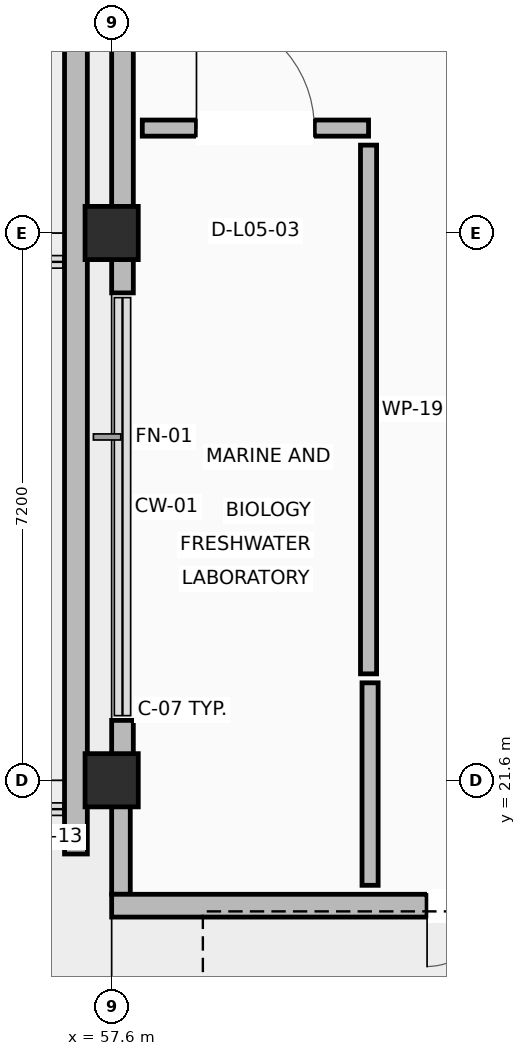
"""IFC4 building model, lengths in metres.
Left out: names, types, materials, properties, quantities, classifications, styles, units other than length and angle.
Written with IfcOpenShell. Run it as: python <this file> out.ifc"""

import sys

from ifc_helpers import new_model, si_unit, direction, frame, frame_2d, origin, origin_2d, place, context, subcontext, project, spatial, rectangle, extrude, element, fill, save


model = new_model("IFC4")
c1 = context("Model", 3, precision=1e-05, world=origin(), true_north=direction((0.0, 1.0)))
c2 = subcontext(c1, "Body", "Model", "MODEL_VIEW")
j1 = project(units=[si_unit("LENGTHUNIT", "METRE"), si_unit("PLANEANGLEUNIT", "RADIAN")], contexts=[c1])
p1 = place(None, origin())
s1 = spatial("IfcSite", under=j1, at=p1, CompositionType="ELEMENT")
p2 = place(p1, origin())
s2 = spatial("IfcBuilding", under=s1, at=p2, CompositionType="ELEMENT")
p3 = place(p2, frame((0.0, 0.0, 22.5)))
s3 = spatial("IfcBuildingStorey", under=s2, at=p3, CompositionType="ELEMENT", Elevation=22.5)
for number, where, z_axis, x_axis in (
    (1, (57.6, 21.6, 0.0), (0.0, 0.0, 1.0), (1.0, 0.0, 0.0)),
    (2, (57.6, 28.8, 0.0), (0.0, 0.0, 1.0), (1.0, 0.0, 0.0)),
):
    element("IfcColumn", number, at=place(p3, frame(where, z_axis=z_axis, x_axis=x_axis)), inside=s3, PredefinedType="COLUMN", context=c2, shape_type="SweptSolid", body=[
        extrude(rectangle(XDim=0.7, YDim=0.7, at=origin_2d()), origin(), (0.0, 0.0, 1.0), 4.5),
    ])
p4 = place(p3, frame((57.742, 28.8, 0.0), z_axis=(0.0, 0.0, 1.0), x_axis=(0.0, 1.0, 0.0)))
e3 = element("IfcWall", 3, at=p4, inside=s3, PredefinedType="STANDARD", context=c2, shape_type="SweptSolid", body=[
    extrude(rectangle(XDim=4.075, YDim=0.285, at=frame_2d((2.038, 0.0))), origin(), (0.0, 0.0, 1.0), 1.45),
])
p5 = place(p3, frame((57.722, 20.1, 0.0), z_axis=(0.0, 0.0, 1.0), x_axis=(0.0, 1.0, 0.0)))
e4 = element("IfcWall", 4, at=p5, inside=s3, PredefinedType="STANDARD", context=c2, shape_type="SweptSolid", body=[
    extrude(rectangle(XDim=1.5, YDim=0.245, at=frame_2d((0.75, 0.0))), origin(), (0.0, 0.0, 1.0), 1.45),
])
p6 = place(p3, frame((57.742, 28.8, 0.0), z_axis=(0.0, 0.0, 1.0), x_axis=(0.0, -1.0, 0.0)))
e5 = element("IfcWall", 5, at=p6, inside=s3, PredefinedType="STANDARD", context=c2, shape_type="SweptSolid", body=[
    extrude(rectangle(XDim=0.788, YDim=0.285, at=frame_2d((0.394, 0.0))), origin(), (0.0, 0.0, 1.0), 1.45),
])
p7 = place(p3, frame((57.742, 22.388, 0.0), z_axis=(0.0, 0.0, 1.0), x_axis=(0.0, -1.0, 0.0)))
e6 = element("IfcWall", 6, at=p7, inside=s3, PredefinedType="STANDARD", context=c2, shape_type="SweptSolid", body=[
    extrude(rectangle(XDim=0.788, YDim=0.285, at=frame_2d((0.394, 0.0))), origin(), (0.0, 0.0, 1.0), 1.45),
])
p8 = place(p3, frame((64.8, 19.95, 0.0), z_axis=(0.0, 0.0, 1.0), x_axis=(-1.0, 0.0, 0.0)))
e7 = element("IfcWall", 7, at=p8, inside=s3, PredefinedType="STANDARD", context=c2, shape_type="SweptSolid", body=[
    extrude(rectangle(XDim=7.2, YDim=0.3, at=frame_2d((3.6, 0.0))), origin(), (0.0, 0.0, 1.0), 3.26),
])
p9 = place(p8, frame((1.45, 0.0, 0.0)))
e8 = element("IfcOpeningElement", 8, at=p9, cuts=e7, PredefinedType="OPENING", context=c2, shape_type="SweptSolid", body=[
    extrude(rectangle(XDim=1.6, YDim=2.2, at=frame_2d((0.8, 1.1))), frame((0.0, 0.16, 0.0), z_axis=(0.0, -1.0, 0.0), x_axis=(1.0, 0.0, 0.0)), (0.0, 0.0, 1.0), 0.32),
])
p10 = place(p3, frame((57.13, 20.63, 0.0), z_axis=(0.0, 0.0, 1.0), x_axis=(0.0, 1.0, 0.0)))
e9 = element("IfcWall", 9, at=p10, inside=s3, PredefinedType="PARAPET", context=c2, shape_type="SweptSolid", body=[
    extrude(rectangle(XDim=11.74, YDim=0.3, at=frame_2d((5.87, 0.0))), origin(), (0.0, 0.0, 1.0), 1.18),
])
p11 = place(p3, frame((58.003, 30.18, 0.0), z_axis=(0.0, 0.0, 1.0), x_axis=(1.0, 0.0, 0.0)))
e10 = element("IfcWall", 10, at=p11, inside=s3, PredefinedType="PARTITIONING", context=c2, shape_type="SweptSolid", body=[
    extrude(rectangle(XDim=2.977, YDim=0.212, at=frame_2d((1.489, 0.0))), origin(), (0.0, 0.0, 1.0), 3.26),
])
p12 = place(p11, frame((0.713, 0.0, 0.0)))
e11 = element("IfcOpeningElement", 11, at=p12, cuts=e10, PredefinedType="OPENING", context=c2, shape_type="SweptSolid", body=[
    extrude(rectangle(XDim=1.55, YDim=2.2, at=frame_2d((0.775, 1.1))), frame((0.0, 0.116, 0.0), z_axis=(0.0, -1.0, 0.0), x_axis=(1.0, 0.0, 0.0)), (0.0, 0.0, 1.0), 0.232),
])
p13 = place(p3, frame((60.98, 29.956, 0.0), z_axis=(0.0, 0.0, 1.0), x_axis=(0.0, -1.0, 0.0)))
e12 = element("IfcWall", 12, at=p13, inside=s3, PredefinedType="PARTITIONING", context=c2, shape_type="SweptSolid", body=[
    extrude(rectangle(XDim=6.956, YDim=0.212, at=frame_2d((3.478, 0.0))), origin(), (0.0, 0.0, 1.0), 3.26),
])
p14 = place(p3, frame((61.0, 22.882, 0.0), z_axis=(0.0, 0.0, 1.0), x_axis=(0.0, -1.0, 0.0)))
e13 = element("IfcWall", 13, at=p14, inside=s3, PredefinedType="PARTITIONING", context=c2, shape_type="SweptSolid", body=[
    extrude(rectangle(XDim=2.664, YDim=0.212, at=frame_2d((1.332, 0.0))), origin(), (0.0, 0.0, 1.0), 3.26),
])
p15 = place(p9, origin())
e14 = element("IfcDoor", 14, at=p15, inside=s3, OperationType="DOUBLE_DOOR_SINGLE_SWING", PredefinedType="DOOR", context=c2, shape_type="SweptSolid", body=[
    extrude(rectangle(XDim=1.6, YDim=2.2, at=frame_2d((0.8, 1.1))), frame((0.0, 0.025, 0.0), z_axis=(0.0, -1.0, 0.0), x_axis=(1.0, 0.0, 0.0)), (0.0, 0.0, 1.0), 0.05),
])
fill(e8, e14)
p16 = place(p12, origin())
e15 = element("IfcDoor", 15, at=p16, inside=s3, OperationType="SINGLE_SWING_LEFT", PredefinedType="DOOR", context=c2, shape_type="SweptSolid", body=[
    extrude(rectangle(XDim=1.55, YDim=2.2, at=frame_2d((0.775, 1.1))), frame((0.0, 0.025, 0.0), z_axis=(0.0, -1.0, 0.0), x_axis=(1.0, 0.0, 0.0)), (0.0, 0.0, 1.0), 0.05),
])
fill(e11, e15)
save(model, sys.argv[1])
